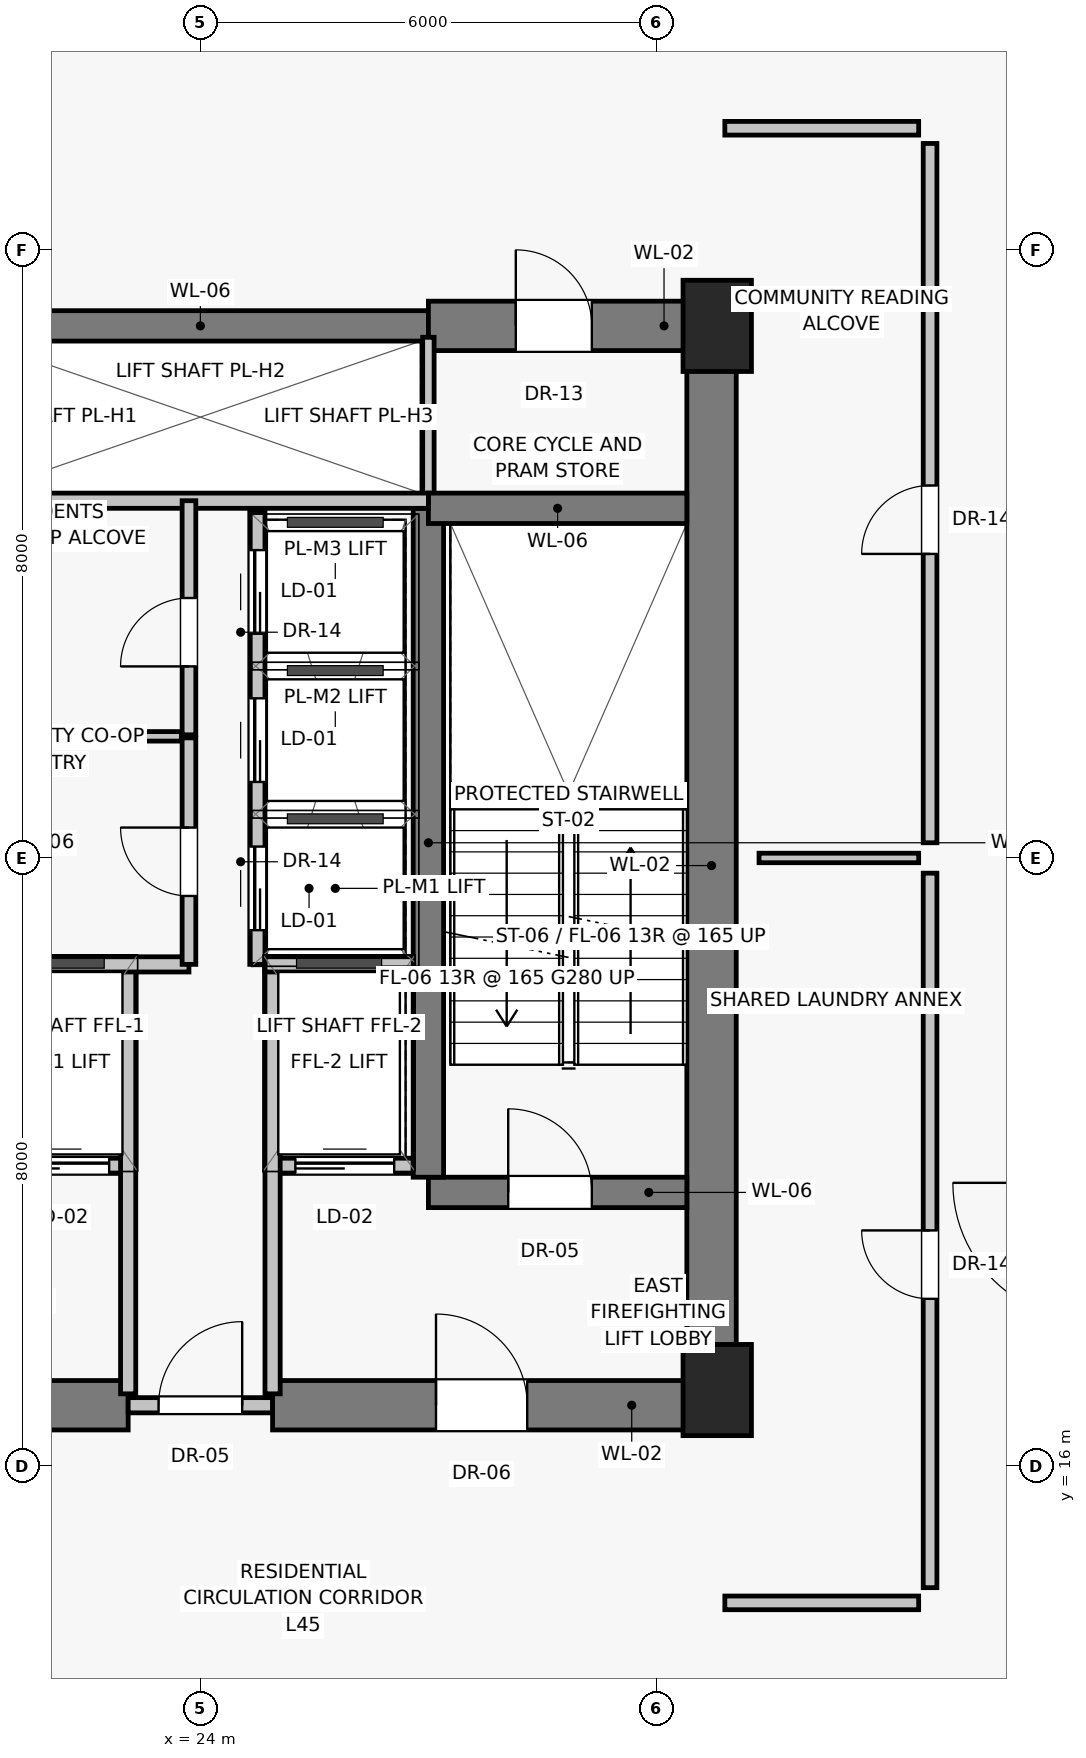
"""IFC4 building model, lengths in metres.
Left out: names, types, materials, properties, quantities, classifications, styles, units other than length and angle.
Written with IfcOpenShell. Run it as: python <this file> out.ifc"""

import sys

from ifc_helpers import new_model, si_unit, direction, frame, frame_2d, origin, origin_2d, place, context, subcontext, project, spatial, rectangle, extrude, source, transform, mapped, element, fill, save


model = new_model("IFC4")
c1 = context("Model", 3, precision=1e-05, world=origin(), true_north=direction((0.0, 1.0)))
c2 = subcontext(c1, "Body", "Model", "MODEL_VIEW")
j1 = project(units=[si_unit("LENGTHUNIT", "METRE"), si_unit("PLANEANGLEUNIT", "RADIAN")], contexts=[c1])
p1 = place(None, origin())
s1 = spatial("IfcSite", under=j1, at=p1, CompositionType="ELEMENT")
p2 = place(p1, origin())
s2 = spatial("IfcBuilding", under=s1, at=p2, CompositionType="ELEMENT")
p3 = place(p2, frame((0.0, 0.0, 158.75)))
s3 = spatial("IfcBuildingStorey", under=s2, at=p3, CompositionType="ELEMENT", Elevation=158.75)
for number, where, z_axis, x_axis in (
    (1, (30.8, 17.0, 0.0), (0.0, 0.0, 1.0), (1.0, 0.0, 0.0)),
    (2, (30.8, 31.0, 0.0), (0.0, 0.0, 1.0), (1.0, 0.0, 0.0)),
):
    element("IfcColumn", number, at=place(p3, frame(where, z_axis=z_axis, x_axis=x_axis)), inside=s3, PredefinedType="PILASTER", context=c2, shape_type="SweptSolid", body=[
        extrude(rectangle(XDim=0.9, YDim=1.2, at=origin_2d()), origin(), (0.0, 0.0, 1.0), 4.3),
    ])
p4 = place(p3, frame((30.725, 16.8, 0.0), z_axis=(0.0, 0.0, 1.0), x_axis=(0.0, 1.0, 0.0)))
e3 = element("IfcWall", 3, at=p4, inside=s3, PredefinedType="SHEAR", context=c2, shape_type="SweptSolid", body=[
    extrude(rectangle(XDim=14.2, YDim=0.65, at=frame_2d((7.1, 0.0))), origin(), (0.0, 0.0, 1.0), 4.05),
])
p5 = place(p3, frame((17.2, 16.8, 0.0), z_axis=(0.0, 0.0, 1.0), x_axis=(1.0, 0.0, 0.0)))
e4 = element("IfcWall", 4, at=p5, inside=s3, PredefinedType="SHEAR", context=c2, shape_type="SweptSolid", body=[
    extrude(rectangle(XDim=5.85, YDim=0.65, at=frame_2d((2.925, 0.0))), origin(), (0.0, 0.0, 1.0), 4.05),
])
p6 = place(p5, frame((1.15, 0.0, 0.0)))
e5 = element("IfcOpeningElement", 5, at=p6, cuts=e4, PredefinedType="OPENING", context=c2, shape_type="SweptSolid", body=[
    extrude(rectangle(XDim=1.2, YDim=2.03, at=frame_2d((0.6, 1.015))), frame((0.0, 0.335, 0.0), z_axis=(0.0, -1.0, 0.0), x_axis=(1.0, 0.0, 0.0)), (0.0, 0.0, 1.0), 0.67),
])
p7 = place(p3, frame((23.05, 16.8, 0.0), z_axis=(0.0, 0.0, 1.0), x_axis=(1.0, 0.0, 0.0)))
e6 = element("IfcWall", 6, at=p7, inside=s3, PredefinedType="SOLIDWALL", context=c2, shape_type="SweptSolid", body=[
    extrude(rectangle(XDim=1.9, YDim=0.2, at=frame_2d((0.95, 0.0))), origin(), (0.0, 0.0, 1.0), 3.2),
])
p8 = place(p7, frame((0.4, 0.0, 0.0)))
e7 = element("IfcOpeningElement", 7, at=p8, cuts=e6, PredefinedType="OPENING", context=c2, shape_type="SweptSolid", body=[
    extrude(rectangle(XDim=1.1, YDim=2.03, at=frame_2d((0.55, 1.015))), frame((0.0, 0.11, 0.0), z_axis=(0.0, -1.0, 0.0), x_axis=(1.0, 0.0, 0.0)), (0.0, 0.0, 1.0), 0.22),
])
p9 = place(p3, frame((24.95, 16.8, 0.0), z_axis=(0.0, 0.0, 1.0), x_axis=(1.0, 0.0, 0.0)))
e8 = element("IfcWall", 8, at=p9, inside=s3, PredefinedType="SHEAR", context=c2, shape_type="SweptSolid", body=[
    extrude(rectangle(XDim=5.85, YDim=0.65, at=frame_2d((2.925, 0.0))), origin(), (0.0, 0.0, 1.0), 4.05),
])
p10 = place(p9, frame((2.15, 0.0, 0.0)))
e9 = element("IfcOpeningElement", 9, at=p10, cuts=e8, PredefinedType="OPENING", context=c2, shape_type="SweptSolid", body=[
    extrude(rectangle(XDim=1.2, YDim=2.03, at=frame_2d((0.6, 1.015))), frame((0.0, 0.335, 0.0), z_axis=(0.0, -1.0, 0.0), x_axis=(1.0, 0.0, 0.0)), (0.0, 0.0, 1.0), 0.67),
])
p11 = place(p3, frame((21.0, 31.0, 0.0), z_axis=(0.0, 0.0, 1.0), x_axis=(1.0, 0.0, 0.0)))
e10 = element("IfcWall", 10, at=p11, inside=s3, PredefinedType="SHEAR", context=c2, shape_type="SweptSolid", body=[
    extrude(rectangle(XDim=6.0, YDim=0.4, at=frame_2d((3.0, 0.0))), origin(), (0.0, 0.0, 1.0), 4.05),
])
p12 = place(p3, frame((27.0, 31.0, 0.0), z_axis=(0.0, 0.0, 1.0), x_axis=(1.0, 0.0, 0.0)))
e11 = element("IfcWall", 11, at=p12, inside=s3, PredefinedType="SHEAR", context=c2, shape_type="SweptSolid", body=[
    extrude(rectangle(XDim=3.8, YDim=0.65, at=frame_2d((1.9, 0.0))), origin(), (0.0, 0.0, 1.0), 4.05),
])
p13 = place(p12, frame((1.15, 0.0, 0.0)))
e12 = element("IfcOpeningElement", 12, at=p13, cuts=e11, PredefinedType="OPENING", context=c2, shape_type="SweptSolid", body=[
    extrude(rectangle(XDim=1.0, YDim=2.01, at=frame_2d((0.5, 1.005))), frame((0.0, 0.335, 0.0), z_axis=(0.0, -1.0, 0.0), x_axis=(1.0, 0.0, 0.0)), (0.0, 0.0, 1.0), 0.67),
])
p14 = place(p3, frame((27.0, 28.65, 0.0), z_axis=(0.0, 0.0, 1.0), x_axis=(0.0, 1.0, 0.0)))
e13 = element("IfcWall", 13, at=p14, inside=s3, PredefinedType="PARTITIONING", context=c2, shape_type="SweptSolid", body=[
    extrude(rectangle(XDim=2.2, YDim=0.15, at=frame_2d((1.1, 0.0))), origin(), (0.0, 0.0, 1.0), 4.05),
])
p15 = place(p3, frame((21.2, 19.95, 0.0), z_axis=(0.0, 0.0, 1.0), x_axis=(1.0, 0.0, 0.0)))
e14 = element("IfcWall", 14, at=p15, inside=s3, PredefinedType="SOLIDWALL", context=c2, shape_type="SweptSolid", body=[
    extrude(rectangle(XDim=1.85, YDim=0.2, at=frame_2d((0.925, 0.0))), origin(), (0.0, 0.0, 1.0), 4.05),
])
p16 = place(p15, frame((0.3, 0.0, 0.0)))
e15 = element("IfcOpeningElement", 15, at=p16, cuts=e14, PredefinedType="OPENING", context=c2, shape_type="SweptSolid", body=[
    extrude(rectangle(XDim=1.3, YDim=2.25, at=frame_2d((0.65, 1.125))), frame((0.0, 0.11, 0.0), z_axis=(0.0, -1.0, 0.0), x_axis=(1.0, 0.0, 0.0)), (0.0, 0.0, 1.0), 0.22),
])
p17 = place(p3, frame((24.95, 19.95, 0.0), z_axis=(0.0, 0.0, 1.0), x_axis=(1.0, 0.0, 0.0)))
e16 = element("IfcWall", 16, at=p17, inside=s3, PredefinedType="SOLIDWALL", context=c2, shape_type="SweptSolid", body=[
    extrude(rectangle(XDim=1.85, YDim=0.2, at=frame_2d((0.925, 0.0))), origin(), (0.0, 0.0, 1.0), 4.05),
])
p18 = place(p17, frame((0.3, 0.0, 0.0)))
e17 = element("IfcOpeningElement", 17, at=p18, cuts=e16, PredefinedType="OPENING", context=c2, shape_type="SweptSolid", body=[
    extrude(rectangle(XDim=1.3, YDim=2.25, at=frame_2d((0.65, 1.125))), frame((0.0, 0.11, 0.0), z_axis=(0.0, -1.0, 0.0), x_axis=(1.0, 0.0, 0.0)), (0.0, 0.0, 1.0), 0.22),
])
p19 = place(p3, frame((27.0, 19.6, 0.0), z_axis=(0.0, 0.0, 1.0), x_axis=(1.0, 0.0, 0.0)))
e18 = element("IfcWall", 18, at=p19, inside=s3, PredefinedType="SHEAR", context=c2, shape_type="SweptSolid", body=[
    extrude(rectangle(XDim=3.4, YDim=0.4, at=frame_2d((1.7, 0.0))), origin(), (0.0, 0.0, 1.0), 4.05),
])
p20 = place(p19, frame((1.05, 0.0, 0.0)))
e19 = element("IfcOpeningElement", 19, at=p20, cuts=e18, PredefinedType="OPENING", context=c2, shape_type="SweptSolid", body=[
    extrude(rectangle(XDim=1.1, YDim=2.03, at=frame_2d((0.55, 1.015))), frame((0.0, 0.21, 0.0), z_axis=(0.0, -1.0, 0.0), x_axis=(1.0, 0.0, 0.0)), (0.0, 0.0, 1.0), 0.42),
])
p21 = place(p3, frame((27.0, 19.8, 0.0), z_axis=(0.0, 0.0, 1.0), x_axis=(0.0, 1.0, 0.0)))
e20 = element("IfcWall", 20, at=p21, inside=s3, PredefinedType="SHEAR", context=c2, shape_type="SweptSolid", body=[
    extrude(rectangle(XDim=8.8, YDim=0.4, at=frame_2d((4.4, 0.0))), origin(), (0.0, 0.0, 1.0), 4.05),
])
p22 = place(p3, frame((27.0, 28.6, 0.0), z_axis=(0.0, 0.0, 1.0), x_axis=(1.0, 0.0, 0.0)))
e21 = element("IfcWall", 21, at=p22, inside=s3, PredefinedType="SHEAR", context=c2, shape_type="SweptSolid", body=[
    extrude(rectangle(XDim=3.4, YDim=0.4, at=frame_2d((1.7, 0.0))), origin(), (0.0, 0.0, 1.0), 4.05),
])
for number, where, z_axis, x_axis in (
    (22, (23.05, 16.95, 0.0), (0.0, 0.0, 1.0), (0.0, 1.0, 0.0)),
    (23, (24.95, 16.95, 0.0), (0.0, 0.0, 1.0), (0.0, 1.0, 0.0)),
):
    element("IfcWall", number, at=place(p3, frame(where, z_axis=z_axis, x_axis=x_axis)), inside=s3, PredefinedType="SOLIDWALL", context=c2, shape_type="SweptSolid", body=[
        extrude(rectangle(XDim=5.6, YDim=0.2, at=frame_2d((2.8, 0.0))), origin(), (0.0, 0.0, 1.0), 4.05),
    ])
p23 = place(p3, frame((21.2, 22.6, 0.0), z_axis=(0.0, 0.0, 1.0), x_axis=(1.0, 0.0, 0.0)))
e24 = element("IfcWall", 24, at=p23, inside=s3, PredefinedType="SOLIDWALL", context=c2, shape_type="SweptSolid", body=[
    extrude(rectangle(XDim=2.65, YDim=0.2, at=frame_2d((1.325, 0.0))), origin(), (0.0, 0.0, 1.0), 4.05),
])
p24 = place(p3, frame((24.85, 22.6, 0.0), z_axis=(0.0, 0.0, 1.0), x_axis=(1.0, 0.0, 0.0)))
e25 = element("IfcWall", 25, at=p24, inside=s3, PredefinedType="SOLIDWALL", context=c2, shape_type="SweptSolid", body=[
    extrude(rectangle(XDim=1.95, YDim=0.2, at=frame_2d((0.975, 0.0))), origin(), (0.0, 0.0, 1.0), 4.05),
])
p25 = place(p3, frame((21.0, 28.7, 0.0), z_axis=(0.0, 0.0, 1.0), x_axis=(1.0, 0.0, 0.0)))
e26 = element("IfcWall", 26, at=p25, inside=s3, PredefinedType="SOLIDWALL", context=c2, shape_type="SweptSolid", body=[
    extrude(rectangle(XDim=6.0, YDim=0.2, at=frame_2d((3.0, 0.0))), origin(), (0.0, 0.0, 1.0), 4.05),
])
p26 = place(p3, frame((23.85, 22.6, 0.0), z_axis=(0.0, 0.0, 1.0), x_axis=(0.0, 1.0, 0.0)))
e27 = element("IfcWall", 27, at=p26, inside=s3, PredefinedType="PARTITIONING", context=c2, shape_type="SweptSolid", body=[
    extrude(rectangle(XDim=2.98, YDim=0.18, at=frame_2d((1.49, 0.0))), origin(), (0.0, 0.0, 1.0), 4.05),
])
p27 = place(p26, frame((0.9, 0.0, 0.0)))
e28 = element("IfcOpeningElement", 28, at=p27, cuts=e27, PredefinedType="OPENING", context=c2, shape_type="SweptSolid", body=[
    extrude(rectangle(XDim=0.9, YDim=2.01, at=frame_2d((0.45, 1.005))), frame((0.0, 0.1, 0.0), z_axis=(0.0, -1.0, 0.0), x_axis=(1.0, 0.0, 0.0)), (0.0, 0.0, 1.0), 0.2),
])
p28 = place(p3, frame((23.85, 25.62, 0.0), z_axis=(0.0, 0.0, 1.0), x_axis=(0.0, 1.0, 0.0)))
e29 = element("IfcWall", 29, at=p28, inside=s3, PredefinedType="PARTITIONING", context=c2, shape_type="SweptSolid", body=[
    extrude(rectangle(XDim=3.08, YDim=0.18, at=frame_2d((1.54, 0.0))), origin(), (0.0, 0.0, 1.0), 4.05),
])
p29 = place(p28, frame((0.9, 0.0, 0.0)))
e30 = element("IfcOpeningElement", 30, at=p29, cuts=e29, PredefinedType="OPENING", context=c2, shape_type="SweptSolid", body=[
    extrude(rectangle(XDim=0.9, YDim=2.01, at=frame_2d((0.45, 1.005))), frame((0.0, 0.1, 0.0), z_axis=(0.0, -1.0, 0.0), x_axis=(1.0, 0.0, 0.0)), (0.0, 0.0, 1.0), 0.2),
])
p30 = place(p3, frame((24.75, 22.6, 0.0), z_axis=(0.0, 0.0, 1.0), x_axis=(0.0, 1.0, 0.0)))
e31 = element("IfcWall", 31, at=p30, inside=s3, PredefinedType="SOLIDWALL", context=c2, shape_type="SweptSolid", body=[
    extrude(rectangle(XDim=5.95, YDim=0.2, at=frame_2d((2.975, 0.0))), origin(), (0.0, 0.0, 1.0), 4.05),
])
p31 = place(p30, frame((0.45, 0.0, 0.0)))
e32 = element("IfcOpeningElement", 32, at=p31, cuts=e31, PredefinedType="OPENING", context=c2, shape_type="SweptSolid", body=[
    extrude(rectangle(XDim=1.1, YDim=2.08, at=frame_2d((0.55, 1.04))), frame((0.0, 0.11, 0.0), z_axis=(0.0, -1.0, 0.0), x_axis=(1.0, 0.0, 0.0)), (0.0, 0.0, 1.0), 0.22),
])
p32 = place(p30, frame((2.4, 0.0, 0.0)))
e33 = element("IfcOpeningElement", 33, at=p32, cuts=e31, PredefinedType="OPENING", context=c2, shape_type="SweptSolid", body=[
    extrude(rectangle(XDim=1.1, YDim=2.08, at=frame_2d((0.55, 1.04))), frame((0.0, 0.11, 0.0), z_axis=(0.0, -1.0, 0.0), x_axis=(1.0, 0.0, 0.0)), (0.0, 0.0, 1.0), 0.22),
])
p33 = place(p30, frame((4.35, 0.0, 0.0)))
e34 = element("IfcOpeningElement", 34, at=p33, cuts=e31, PredefinedType="OPENING", context=c2, shape_type="SweptSolid", body=[
    extrude(rectangle(XDim=1.1, YDim=2.08, at=frame_2d((0.55, 1.04))), frame((0.0, 0.11, 0.0), z_axis=(0.0, -1.0, 0.0), x_axis=(1.0, 0.0, 0.0)), (0.0, 0.0, 1.0), 0.22),
])
p34 = place(p3, frame((21.35, 25.6, 0.0), z_axis=(0.0, 0.0, 1.0), x_axis=(1.0, 0.0, 0.0)))
e35 = element("IfcWall", 35, at=p34, inside=s3, PredefinedType="PARTITIONING", context=c2, shape_type="SweptSolid", body=[
    extrude(rectangle(XDim=2.4, YDim=0.125, at=frame_2d((1.2, 0.0))), origin(), (0.0, 0.0, 1.0), 4.05),
])
p35 = place(p3, frame((33.6, 14.4, 0.0), z_axis=(0.0, 0.0, 1.0), x_axis=(0.0, 1.0, 0.0)))
e36 = element("IfcWall", 36, at=p35, inside=s3, PredefinedType="PARTITIONING", context=c2, shape_type="SweptSolid", body=[
    extrude(rectangle(XDim=9.4, YDim=0.18, at=frame_2d((4.7, 0.0))), origin(), (0.0, 0.0, 1.0), 4.05),
])
p36 = place(p35, frame((3.8, 0.0, 0.0)))
e37 = element("IfcOpeningElement", 37, at=p36, cuts=e36, PredefinedType="OPENING", context=c2, shape_type="SweptSolid", body=[
    extrude(rectangle(XDim=0.9, YDim=2.01, at=frame_2d((0.45, 1.005))), frame((0.0, 0.1, 0.0), z_axis=(0.0, -1.0, 0.0), x_axis=(1.0, 0.0, 0.0)), (0.0, 0.0, 1.0), 0.2),
])
p37 = place(p3, frame((33.6, 24.2, 0.0), z_axis=(0.0, 0.0, 1.0), x_axis=(0.0, 1.0, 0.0)))
e38 = element("IfcWall", 38, at=p37, inside=s3, PredefinedType="PARTITIONING", context=c2, shape_type="SweptSolid", body=[
    extrude(rectangle(XDim=9.2, YDim=0.18, at=frame_2d((4.6, 0.0))), origin(), (0.0, 0.0, 1.0), 4.05),
])
p38 = place(p37, frame((3.8, 0.0, 0.0)))
e39 = element("IfcOpeningElement", 39, at=p38, cuts=e38, PredefinedType="OPENING", context=c2, shape_type="SweptSolid", body=[
    extrude(rectangle(XDim=0.9, YDim=2.01, at=frame_2d((0.45, 1.005))), frame((0.0, 0.1, 0.0), z_axis=(0.0, -1.0, 0.0), x_axis=(1.0, 0.0, 0.0)), (0.0, 0.0, 1.0), 0.2),
])
p39 = place(p3, frame((31.35, 24.0, 0.0), z_axis=(0.0, 0.0, 1.0), x_axis=(1.0, 0.0, 0.0)))
e40 = element("IfcWall", 40, at=p39, inside=s3, PredefinedType="PARTITIONING", context=c2, shape_type="SweptSolid", body=[
    extrude(rectangle(XDim=2.1, YDim=0.125, at=frame_2d((1.05, 0.0))), origin(), (0.0, 0.0, 1.0), 4.05),
])
for number, where, z_axis, x_axis in (
    (41, (30.9, 14.2, 0.0), (0.0, 0.0, 1.0), (1.0, 0.0, 0.0)),
    (42, (30.9, 33.6, 0.0), (0.0, 0.0, 1.0), (1.0, 0.0, 0.0)),
):
    element("IfcWall", number, at=place(p3, frame(where, z_axis=z_axis, x_axis=x_axis)), inside=s3, PredefinedType="PARTITIONING", context=c2, shape_type="SweptSolid", body=[
        extrude(rectangle(XDim=2.55, YDim=0.18, at=frame_2d((1.275, 0.0))), origin(), (0.0, 0.0, 1.0), 4.05),
    ])
m1 = source(origin(), c2, "Body", "SweptSolid", [
    extrude(rectangle(XDim=1.1, YDim=2.03, at=frame_2d((0.55, 1.015))), frame((0.0, 0.025, 0.0), z_axis=(0.0, -1.0, 0.0), x_axis=(1.0, 0.0, 0.0)), (0.0, 0.0, 1.0), 0.05),
])
p40 = place(p8, origin())
e43 = element("IfcDoor", 43, at=p40, inside=s3, OperationType="SINGLE_SWING_RIGHT", PredefinedType="DOOR", context=c2, shape_type="MappedRepresentation", body=[
    mapped(m1, transform((0.0, 0.0, 0.0), scale=1.0)),
])
fill(e7, e43)
m2 = source(origin(), c2, "Body", "SweptSolid", [
    extrude(rectangle(XDim=1.2, YDim=2.03, at=frame_2d((0.6, 1.015))), frame((0.0, 0.025, 0.0), z_axis=(0.0, -1.0, 0.0), x_axis=(1.0, 0.0, 0.0)), (0.0, 0.0, 1.0), 0.05),
])
p41 = place(p10, origin())
e44 = element("IfcDoor", 44, at=p41, inside=s3, OperationType="SINGLE_SWING_LEFT", PredefinedType="DOOR", context=c2, shape_type="MappedRepresentation", body=[
    mapped(m2, transform((0.0, 0.0, 0.0), scale=1.0)),
])
fill(e9, e44)
m3 = source(origin(), c2, "Body", "SweptSolid", [
    extrude(rectangle(XDim=1.0, YDim=2.01, at=frame_2d((0.5, 1.005))), frame((0.0, 0.025, 0.0), z_axis=(0.0, -1.0, 0.0), x_axis=(1.0, 0.0, 0.0)), (0.0, 0.0, 1.0), 0.05),
])
p42 = place(p13, origin())
e45 = element("IfcDoor", 45, at=p42, inside=s3, OperationType="SINGLE_SWING_LEFT", PredefinedType="DOOR", context=c2, shape_type="MappedRepresentation", body=[
    mapped(m3, transform((0.0, 0.0, 0.0), scale=1.0)),
])
fill(e12, e45)
m4 = source(origin(), c2, "Body", "SweptSolid", [
    extrude(rectangle(XDim=1.3, YDim=2.25, at=frame_2d((0.65, 1.125))), frame((0.0, 0.025, 0.0), z_axis=(0.0, -1.0, 0.0), x_axis=(1.0, 0.0, 0.0)), (0.0, 0.0, 1.0), 0.05),
])
p43 = place(p16, origin())
e46 = element("IfcDoor", 46, at=p43, inside=s3, OperationType="SLIDING_TO_LEFT", PredefinedType="DOOR", context=c2, shape_type="MappedRepresentation", body=[
    mapped(m4, transform((0.0, 0.0, 0.0), scale=1.0)),
])
fill(e15, e46)
p44 = place(p18, origin())
e47 = element("IfcDoor", 47, at=p44, inside=s3, OperationType="SLIDING_TO_LEFT", PredefinedType="DOOR", context=c2, shape_type="MappedRepresentation", body=[
    mapped(m4, transform((0.0, 0.0, 0.0), scale=1.0)),
])
fill(e17, e47)
p45 = place(p20, origin())
e48 = element("IfcDoor", 48, at=p45, inside=s3, OperationType="SINGLE_SWING_LEFT", PredefinedType="DOOR", context=c2, shape_type="MappedRepresentation", body=[
    mapped(m1, transform((0.0, 0.0, 0.0), scale=1.0)),
])
fill(e19, e48)
m5 = source(origin(), c2, "Body", "SweptSolid", [
    extrude(rectangle(XDim=0.9, YDim=2.01, at=frame_2d((0.45, 1.005))), frame((0.0, 0.025, 0.0), z_axis=(0.0, -1.0, 0.0), x_axis=(1.0, 0.0, 0.0)), (0.0, 0.0, 1.0), 0.05),
])
p46 = place(p27, origin())
e49 = element("IfcDoor", 49, at=p46, inside=s3, OperationType="SINGLE_SWING_RIGHT", PredefinedType="DOOR", context=c2, shape_type="MappedRepresentation", body=[
    mapped(m5, transform((0.0, 0.0, 0.0), scale=1.0)),
])
fill(e28, e49)
p47 = place(p29, origin())
e50 = element("IfcDoor", 50, at=p47, inside=s3, OperationType="SINGLE_SWING_LEFT", PredefinedType="DOOR", context=c2, shape_type="MappedRepresentation", body=[
    mapped(m5, transform((0.0, 0.0, 0.0), scale=1.0)),
])
fill(e30, e50)
m6 = source(origin(), c2, "Body", "SweptSolid", [
    extrude(rectangle(XDim=1.1, YDim=2.08, at=frame_2d((0.55, 1.04))), frame((0.0, 0.025, 0.0), z_axis=(0.0, -1.0, 0.0), x_axis=(1.0, 0.0, 0.0)), (0.0, 0.0, 1.0), 0.05),
])
p48 = place(p31, origin())
e51 = element("IfcDoor", 51, at=p48, inside=s3, OperationType="SLIDING_TO_LEFT", PredefinedType="DOOR", context=c2, shape_type="MappedRepresentation", body=[
    mapped(m6, transform((0.0, 0.0, 0.0), scale=1.0)),
])
fill(e32, e51)
p49 = place(p32, origin())
e52 = element("IfcDoor", 52, at=p49, inside=s3, OperationType="SLIDING_TO_LEFT", PredefinedType="DOOR", context=c2, shape_type="MappedRepresentation", body=[
    mapped(m6, transform((0.0, 0.0, 0.0), scale=1.0)),
])
fill(e33, e52)
p50 = place(p33, origin())
e53 = element("IfcDoor", 53, at=p50, inside=s3, OperationType="SLIDING_TO_LEFT", PredefinedType="DOOR", context=c2, shape_type="MappedRepresentation", body=[
    mapped(m6, transform((0.0, 0.0, 0.0), scale=1.0)),
])
fill(e34, e53)
p51 = place(p36, origin())
e54 = element("IfcDoor", 54, at=p51, inside=s3, OperationType="SINGLE_SWING_RIGHT", PredefinedType="DOOR", context=c2, shape_type="MappedRepresentation", body=[
    mapped(m5, transform((0.0, 0.0, 0.0), scale=1.0)),
])
fill(e37, e54)
p52 = place(p38, origin())
e55 = element("IfcDoor", 55, at=p52, inside=s3, OperationType="SINGLE_SWING_LEFT", PredefinedType="DOOR", context=c2, shape_type="MappedRepresentation", body=[
    mapped(m5, transform((0.0, 0.0, 0.0), scale=1.0)),
])
fill(e39, e55)
save(model, sys.argv[1])
